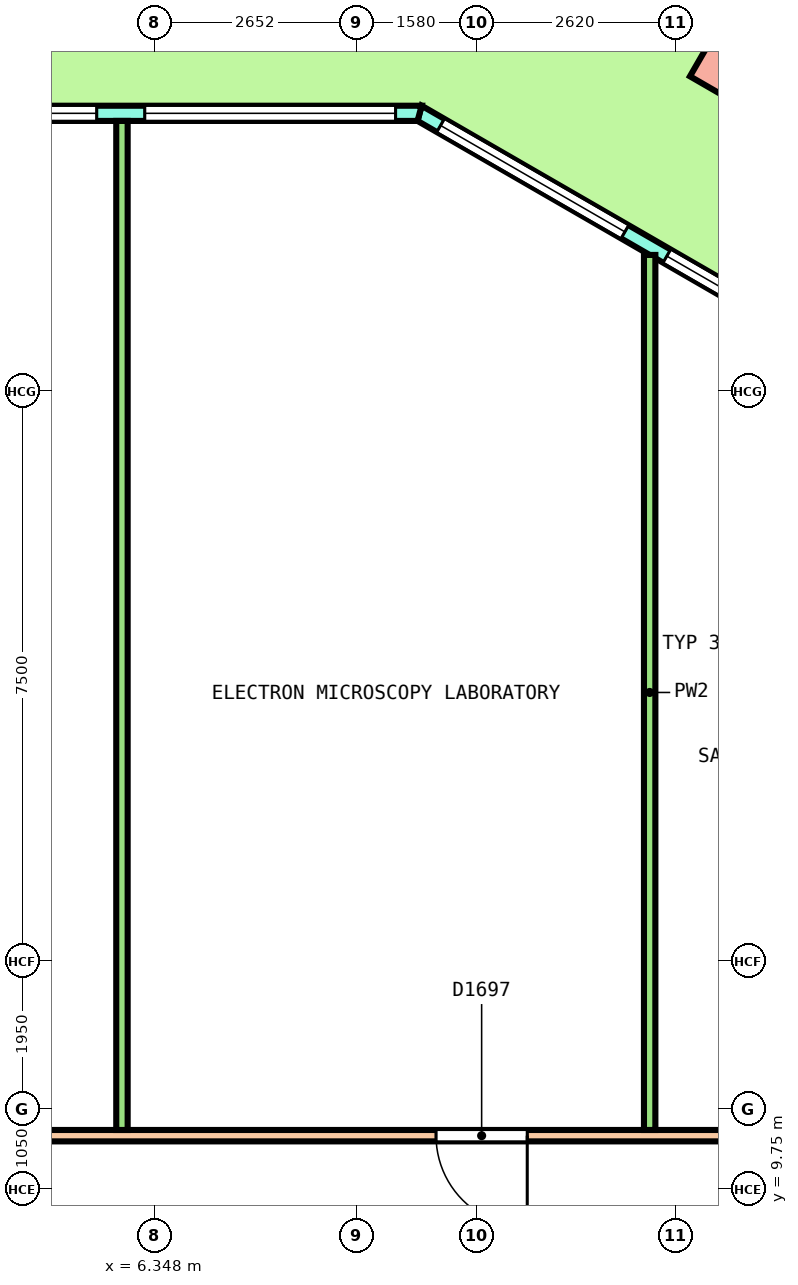
"""IFC4 building model, lengths in metres.
Left out: names, types, materials, properties, quantities, classifications, styles, units other than length and angle.
Written with IfcOpenShell. Run it as: python <this file> out.ifc"""

import sys

from ifc_helpers import new_model, si_unit, direction, frame, frame_2d, origin, origin_2d, place, context, subcontext, project, spatial, polyline, rectangle, outline, extrude, element, fill, save


model = new_model("IFC4")
c1 = context("Model", 3, precision=1e-05, world=origin(), true_north=direction((0.0, 1.0)))
c2 = subcontext(c1, "Body", "Model", "MODEL_VIEW")
j1 = project(units=[si_unit("LENGTHUNIT", "METRE"), si_unit("PLANEANGLEUNIT", "RADIAN")], contexts=[c1])
p1 = place(None, origin())
s1 = spatial("IfcSite", under=j1, at=p1, CompositionType="ELEMENT")
p2 = place(p1, origin())
s2 = spatial("IfcBuilding", under=s1, at=p2, CompositionType="ELEMENT")
p3 = place(p2, frame((0.0, 0.0, 145.2)))
s3 = spatial("IfcBuildingStorey", under=s2, at=p3, CompositionType="ELEMENT", Elevation=145.2)
p4 = place(p3, frame((14.206, 24.606, 0.0), z_axis=(0.036325398096, 0.0, 0.999340014936), x_axis=(-0.865311654478, 0.500246354177, 0.031453549198)))
e1 = element("IfcColumn", 1, at=p4, inside=s3, PredefinedType="COLUMN", context=c2, shape_type="SweptSolid", body=[
    extrude(rectangle(XDim=1.2, YDim=1.2, at=origin_2d()), origin(), (0.0, 0.0, 1.0), 4.053),
])
p5 = place(p3, frame((15.783, 20.463, 0.0), z_axis=(0.0, 0.0, 1.0), x_axis=(-0.866029458321, 0.49999297727, 0.0)))
e2 = element("IfcWall", 2, at=p5, inside=s3, PredefinedType="SOLIDWALL", context=c2, shape_type="SweptSolid", body=[
    extrude(outline(polyline([(-0.027, -0.1), (1.128, -0.1), (2.282, -0.1), (3.437, -0.1), (4.592, -0.1), (5.747, -0.1), (6.901, -0.1), (6.848, 0.1), (5.711, 0.1), (4.574, 0.1), (3.437, 0.1), (2.301, 0.1), (1.164, 0.1), (0.027, 0.1), (-0.027, -0.1)])), origin(), (0.0, 0.0, 1.0), 4.1),
])
p6 = place(p5, frame((0.319, 0.0, 0.1)))
e3 = element("IfcOpeningElement", 3, at=p6, cuts=e2, PredefinedType="OPENING", context=c2, shape_type="SweptSolid", body=[
    extrude(rectangle(XDim=2.8, YDim=2.9, at=frame_2d((1.4, 1.45))), frame((0.0, 0.11, 0.0), z_axis=(0.0, -1.0, 0.0), x_axis=(1.0, 0.0, 0.0)), (0.0, 0.0, 1.0), 0.22),
])
p7 = place(p5, frame((3.756, 0.0, 0.1)))
e4 = element("IfcOpeningElement", 4, at=p7, cuts=e2, PredefinedType="OPENING", context=c2, shape_type="SweptSolid", body=[
    extrude(rectangle(XDim=2.8, YDim=2.9, at=frame_2d((1.4, 1.45))), frame((0.0, 0.11, 0.0), z_axis=(0.0, -1.0, 0.0), x_axis=(1.0, 0.0, 0.0)), (0.0, 0.0, 1.0), 0.22),
])
p8 = place(p3, frame((9.83, 23.9, 0.0), z_axis=(0.0, 0.0, 1.0), x_axis=(-1.0, 0.0, 0.0)))
e5 = element("IfcWall", 5, at=p8, inside=s3, PredefinedType="SOLIDWALL", context=c2, shape_type="SweptSolid", body=[
    extrude(outline(polyline([(-0.027, -0.1), (1.011, -0.1), (2.048, -0.1), (3.086, -0.1), (4.123, -0.1), (5.161, -0.1), (6.198, -0.1), (7.236, -0.1), (8.273, -0.1), (9.311, -0.1), (10.348, -0.1), (11.386, -0.1), (12.423, -0.1), (13.461, -0.1), (14.499, -0.1), (15.536, -0.1), (16.573, -0.1), (17.611, -0.1), (18.648, -0.1), (19.686, -0.1), (19.632, 0.1), (18.6, 0.1), (17.569, 0.1), (16.537, 0.1), (15.505, 0.1), (14.473, 0.1), (13.441, 0.1), (12.409, 0.1), (11.377, 0.1), (10.345, 0.1), (9.314, 0.1), (8.282, 0.1), (7.25, 0.1), (6.218, 0.1), (5.186, 0.1), (4.154, 0.1), (3.123, 0.1), (2.091, 0.1), (1.059, 0.1), (0.027, 0.1), (-0.027, -0.1)])), origin(), (0.0, 0.0, 1.0), 4.1),
])
p9 = place(p8, frame((0.316, 0.0, 0.1)))
e6 = element("IfcOpeningElement", 6, at=p9, cuts=e5, PredefinedType="OPENING", context=c2, shape_type="SweptSolid", body=[
    extrude(rectangle(XDim=3.3, YDim=2.9, at=frame_2d((1.65, 1.45))), frame((0.0, 0.11, 0.0), z_axis=(0.0, -1.0, 0.0), x_axis=(1.0, 0.0, 0.0)), (0.0, 0.0, 1.0), 0.22),
])
p10 = place(p8, frame((4.248, 0.0, 0.1)))
e7 = element("IfcOpeningElement", 7, at=p10, cuts=e5, PredefinedType="OPENING", context=c2, shape_type="SweptSolid", body=[
    extrude(rectangle(XDim=3.3, YDim=2.9, at=frame_2d((1.65, 1.45))), frame((0.0, 0.11, 0.0), z_axis=(0.0, -1.0, 0.0), x_axis=(1.0, 0.0, 0.0)), (0.0, 0.0, 1.0), 0.22),
])
p11 = place(p8, frame((8.93, 0.0, 0.0)))
e8 = element("IfcOpeningElement", 8, at=p11, cuts=e5, PredefinedType="OPENING", context=c2, shape_type="SweptSolid", body=[
    extrude(rectangle(XDim=1.8, YDim=2.4, at=frame_2d((0.9, 1.2))), frame((0.0, 0.11, 0.0), z_axis=(0.0, -1.0, 0.0), x_axis=(1.0, 0.0, 0.0)), (0.0, 0.0, 1.0), 0.22),
])
p12 = place(p8, frame((8.93, 0.0, 2.55)))
e9 = element("IfcOpeningElement", 9, at=p12, cuts=e5, PredefinedType="OPENING", context=c2, shape_type="SweptSolid", body=[
    extrude(rectangle(XDim=1.8, YDim=0.45, at=frame_2d((0.9, 0.225))), frame((0.0, 0.11, 0.0), z_axis=(0.0, -1.0, 0.0), x_axis=(1.0, 0.0, 0.0)), (0.0, 0.0, 1.0), 0.22),
])
p13 = place(p8, frame((12.112, 0.0, 0.1)))
e10 = element("IfcOpeningElement", 10, at=p13, cuts=e5, PredefinedType="OPENING", context=c2, shape_type="SweptSolid", body=[
    extrude(rectangle(XDim=3.3, YDim=2.9, at=frame_2d((1.65, 1.45))), frame((0.0, 0.11, 0.0), z_axis=(0.0, -1.0, 0.0), x_axis=(1.0, 0.0, 0.0)), (0.0, 0.0, 1.0), 0.22),
])
p14 = place(p8, frame((16.043, 0.0, 0.1)))
e11 = element("IfcOpeningElement", 11, at=p14, cuts=e5, PredefinedType="OPENING", context=c2, shape_type="SweptSolid", body=[
    extrude(rectangle(XDim=3.3, YDim=2.9, at=frame_2d((1.65, 1.45))), frame((0.0, 0.11, 0.0), z_axis=(0.0, -1.0, 0.0), x_axis=(1.0, 0.0, 0.0)), (0.0, 0.0, 1.0), 0.22),
])
p15 = place(p3, frame((-15.475, 10.45, 0.0), z_axis=(0.0, 0.0, 1.0), x_axis=(1.0, 0.0, 0.0)))
e12 = element("IfcWall", 12, at=p15, inside=s3, PredefinedType="PARTITIONING", context=c2, shape_type="SweptSolid", body=[
    extrude(rectangle(XDim=31.1, YDim=0.15, at=frame_2d((15.55, 0.0))), origin(), (0.0, 0.0, 1.0), 3.05),
])
p16 = place(p15, frame((25.521, 0.0, 0.0)))
e13 = element("IfcOpeningElement", 13, at=p16, cuts=e12, PredefinedType="OPENING", context=c2, shape_type="SweptSolid", body=[
    extrude(rectangle(XDim=1.2, YDim=2.1, at=frame_2d((0.6, 1.05))), frame((0.0, 0.085, 0.0), z_axis=(0.0, -1.0, 0.0), x_axis=(1.0, 0.0, 0.0)), (0.0, 0.0, 1.0), 0.17),
])
p17 = place(p15, frame((14.984, 0.0, 0.0)))
e14 = element("IfcOpeningElement", 14, at=p17, cuts=e12, PredefinedType="OPENING", context=c2, shape_type="SweptSolid", body=[
    extrude(rectangle(XDim=1.2, YDim=2.1, at=frame_2d((0.6, 1.05))), frame((0.0, 0.085, 0.0), z_axis=(0.0, -1.0, 0.0), x_axis=(1.0, 0.0, 0.0)), (0.0, 0.0, 1.0), 0.17),
])
p18 = place(p15, frame((2.741, 0.0, 0.0)))
e15 = element("IfcOpeningElement", 15, at=p18, cuts=e12, PredefinedType="OPENING", context=c2, shape_type="SweptSolid", body=[
    extrude(rectangle(XDim=1.2, YDim=2.1, at=frame_2d((0.6, 1.05))), frame((0.0, 0.085, 0.0), z_axis=(0.0, -1.0, 0.0), x_axis=(1.0, 0.0, 0.0)), (0.0, 0.0, 1.0), 0.17),
])
p19 = place(p3, frame((12.856, 10.525, 0.0), z_axis=(0.0, 0.0, 1.0), x_axis=(0.0, 1.0, 0.0)))
e16 = element("IfcWall", 16, at=p19, inside=s3, PredefinedType="PARTITIONING", context=c2, shape_type="SweptSolid", body=[
    extrude(rectangle(XDim=11.512, YDim=0.15, at=frame_2d((5.756, 0.0))), origin(), (0.0, 0.0, 1.0), 3.05),
])
p20 = place(p3, frame((5.914, 10.525, 0.0), z_axis=(0.0, 0.0, 1.0), x_axis=(0.0, 1.0, 0.0)))
e17 = element("IfcWall", 17, at=p20, inside=s3, PredefinedType="PARTITIONING", context=c2, shape_type="SweptSolid", body=[
    extrude(rectangle(XDim=13.275, YDim=0.15, at=frame_2d((6.638, 0.0))), origin(), (0.0, 0.0, 1.0), 3.05),
])
p21 = place(p6, origin())
e18 = element("IfcWindow", 18, at=p21, inside=s3, PartitioningType="SINGLE_PANEL", PredefinedType="WINDOW", context=c2, shape_type="SweptSolid", body=[
    extrude(rectangle(XDim=2.8, YDim=2.9, at=frame_2d((1.4, 1.45))), frame((0.0, 0.03, 0.0), z_axis=(0.0, -1.0, 0.0), x_axis=(1.0, 0.0, 0.0)), (0.0, 0.0, 1.0), 0.06),
])
fill(e3, e18)
p22 = place(p7, origin())
e19 = element("IfcWindow", 19, at=p22, inside=s3, PartitioningType="SINGLE_PANEL", PredefinedType="WINDOW", context=c2, shape_type="SweptSolid", body=[
    extrude(rectangle(XDim=2.8, YDim=2.9, at=frame_2d((1.4, 1.45))), frame((0.0, 0.03, 0.0), z_axis=(0.0, -1.0, 0.0), x_axis=(1.0, 0.0, 0.0)), (0.0, 0.0, 1.0), 0.06),
])
fill(e4, e19)
p23 = place(p9, origin())
e20 = element("IfcWindow", 20, at=p23, inside=s3, PartitioningType="SINGLE_PANEL", PredefinedType="WINDOW", context=c2, shape_type="SweptSolid", body=[
    extrude(rectangle(XDim=3.3, YDim=2.9, at=frame_2d((1.65, 1.45))), frame((0.0, 0.03, 0.0), z_axis=(0.0, -1.0, 0.0), x_axis=(1.0, 0.0, 0.0)), (0.0, 0.0, 1.0), 0.06),
])
fill(e6, e20)
p24 = place(p10, origin())
e21 = element("IfcWindow", 21, at=p24, inside=s3, PartitioningType="SINGLE_PANEL", PredefinedType="WINDOW", context=c2, shape_type="SweptSolid", body=[
    extrude(rectangle(XDim=3.3, YDim=2.9, at=frame_2d((1.65, 1.45))), frame((0.0, 0.03, 0.0), z_axis=(0.0, -1.0, 0.0), x_axis=(1.0, 0.0, 0.0)), (0.0, 0.0, 1.0), 0.06),
])
fill(e7, e21)
p25 = place(p16, origin())
e22 = element("IfcDoor", 22, at=p25, inside=s3, OperationType="DOUBLE_DOOR_SINGLE_SWING", PredefinedType="DOOR", context=c2, shape_type="SweptSolid", body=[
    extrude(rectangle(XDim=1.2, YDim=2.1, at=frame_2d((0.6, 1.05))), frame((0.0, 0.025, 0.0), z_axis=(0.0, -1.0, 0.0), x_axis=(1.0, 0.0, 0.0)), (0.0, 0.0, 1.0), 0.05),
])
fill(e13, e22)
save(model, sys.argv[1])
